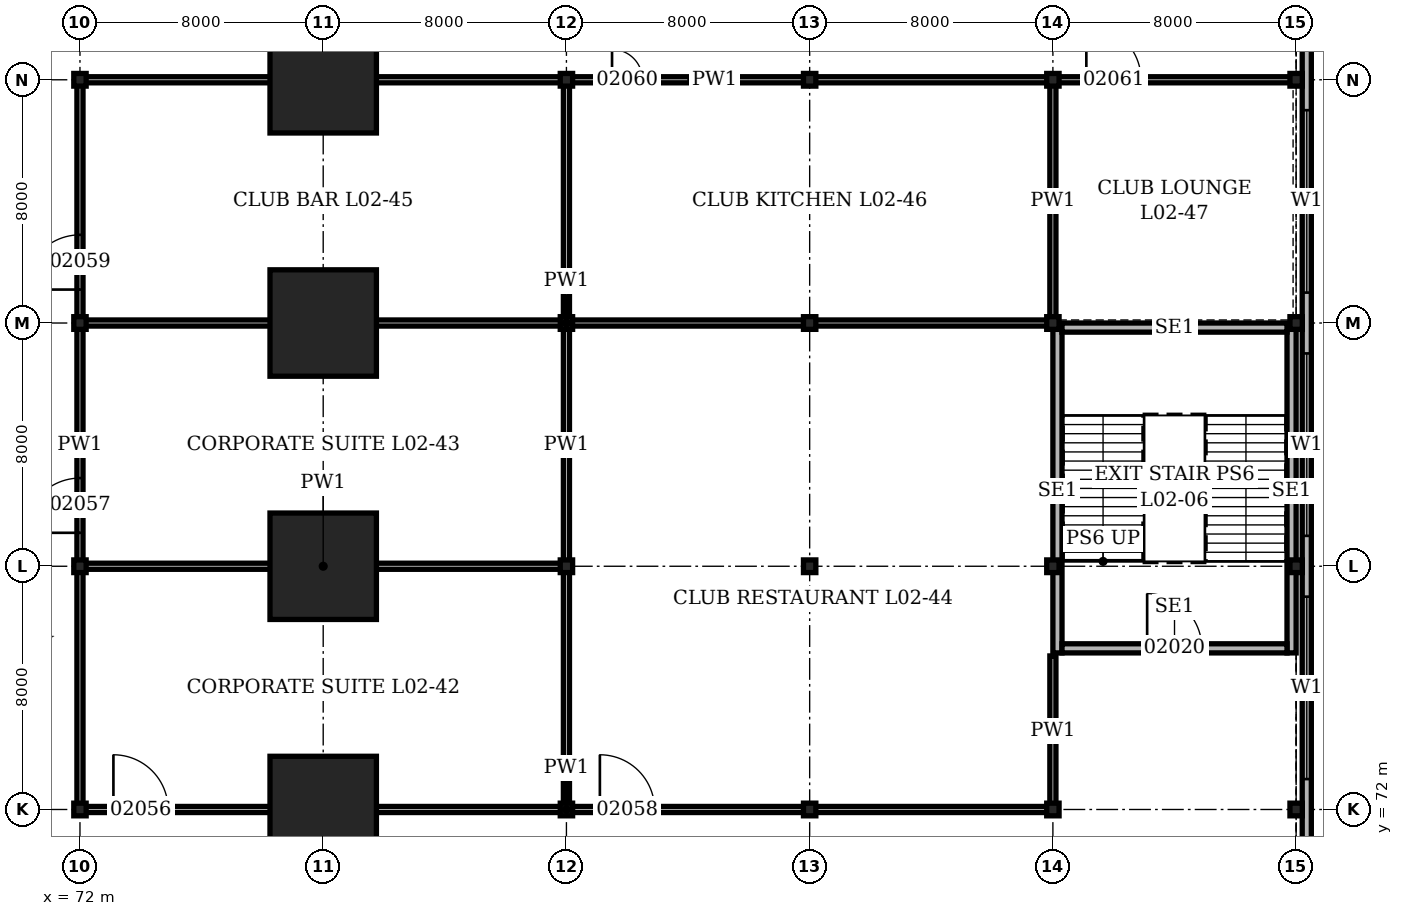
"""IFC4 building model, lengths in metres.
Left out: names, types, materials, properties, quantities, classifications, styles, units other than length and angle.
Written with IfcOpenShell. Run it as: python <this file> out.ifc"""

import sys

from ifc_helpers import new_model, si_unit, direction, frame, frame_2d, origin, origin_2d, place, context, subcontext, project, spatial, rectangle, hollow_rectangle, i_section, extrude, element, fill, save


model = new_model("IFC4")
c1 = context("Model", 3, precision=1e-05, world=origin(), true_north=direction((0.0, 1.0)))
c2 = subcontext(c1, "Body", "Model", "MODEL_VIEW")
j1 = project(units=[si_unit("LENGTHUNIT", "METRE"), si_unit("PLANEANGLEUNIT", "RADIAN")], contexts=[c1])
p1 = place(None, origin())
s1 = spatial("IfcSite", under=j1, at=p1, CompositionType="ELEMENT")
p2 = place(p1, origin())
s2 = spatial("IfcBuilding", under=s1, at=p2, CompositionType="ELEMENT")
p3 = place(p2, frame((0.0, 0.0, 9.9)))
s3 = spatial("IfcBuildingStorey", under=s2, at=p3, CompositionType="ELEMENT", Elevation=9.9)
for number, where, z_axis, x_axis in (
    (1, (72.0, 72.0, 0.0), (0.0, 0.0, 1.0), (1.0, 0.0, 0.0)),
    (2, (72.0, 80.0, 0.0), (0.0, 0.0, 1.0), (1.0, 0.0, 0.0)),
    (3, (72.0, 88.0, 0.0), (0.0, 0.0, 1.0), (1.0, 0.0, 0.0)),
    (4, (72.0, 96.0, 0.0), (0.0, 0.0, 1.0), (1.0, 0.0, 0.0)),
):
    element("IfcColumn", number, at=place(p3, frame(where, z_axis=z_axis, x_axis=x_axis)), inside=s3, PredefinedType="COLUMN", context=c2, shape_type="SweptSolid", body=[
        extrude(i_section(OverallWidth=0.406, OverallDepth=0.417, WebThickness=0.03, FlangeThickness=0.048, at=origin_2d()), origin(), (0.0, 0.0, 1.0), 5.0),
    ])
for number, where, z_axis, x_axis in (
    (5, (80.0, 72.0, 0.0), (0.0, 0.0, 1.0), (1.0, 0.0, 0.0)),
    (6, (80.0, 80.0, 0.0), (0.0, 0.0, 1.0), (1.0, 0.0, 0.0)),
    (7, (80.0, 88.0, 0.0), (0.0, 0.0, 1.0), (1.0, 0.0, 0.0)),
    (8, (80.0, 96.0, 0.0), (0.0, 0.0, 1.0), (1.0, 0.0, 0.0)),
):
    element("IfcColumn", number, at=place(p3, frame(where, z_axis=z_axis, x_axis=x_axis)), inside=s3, PredefinedType="COLUMN", context=c2, shape_type="SweptSolid", body=[
        extrude(hollow_rectangle(XDim=3.5, YDim=3.5, WallThickness=0.5, at=origin_2d()), origin(), (0.0, 0.0, 1.0), 5.0),
    ])
for number, where, z_axis, x_axis in (
    (9, (88.0, 72.0, 0.0), (0.0, 0.0, 1.0), (1.0, 0.0, 0.0)),
    (10, (88.0, 80.0, 0.0), (0.0, 0.0, 1.0), (1.0, 0.0, 0.0)),
    (11, (88.0, 88.0, 0.0), (0.0, 0.0, 1.0), (1.0, 0.0, 0.0)),
    (12, (88.0, 96.0, 0.0), (0.0, 0.0, 1.0), (1.0, 0.0, 0.0)),
    (13, (96.0, 72.0, 0.0), (0.0, 0.0, 1.0), (1.0, 0.0, 0.0)),
    (14, (96.0, 80.0, 0.0), (0.0, 0.0, 1.0), (1.0, 0.0, 0.0)),
    (15, (96.0, 88.0, 0.0), (0.0, 0.0, 1.0), (1.0, 0.0, 0.0)),
    (16, (96.0, 96.0, 0.0), (0.0, 0.0, 1.0), (1.0, 0.0, 0.0)),
    (17, (104.0, 72.0, 0.0), (0.0, 0.0, 1.0), (1.0, 0.0, 0.0)),
    (18, (104.0, 80.0, 0.0), (0.0, 0.0, 1.0), (1.0, 0.0, 0.0)),
    (19, (104.0, 88.0, 0.0), (0.0, 0.0, 1.0), (1.0, 0.0, 0.0)),
    (20, (104.0, 96.0, 0.0), (0.0, 0.0, 1.0), (1.0, 0.0, 0.0)),
    (21, (112.0, 72.0, 0.0), (0.0, 0.0, 1.0), (1.0, 0.0, 0.0)),
    (22, (112.0, 80.0, 0.0), (0.0, 0.0, 1.0), (1.0, 0.0, 0.0)),
    (23, (112.0, 88.0, 0.0), (0.0, 0.0, 1.0), (1.0, 0.0, 0.0)),
    (24, (112.0, 96.0, 0.0), (0.0, 0.0, 1.0), (1.0, 0.0, 0.0)),
):
    element("IfcColumn", number, at=place(p3, frame(where, z_axis=z_axis, x_axis=x_axis)), inside=s3, PredefinedType="COLUMN", context=c2, shape_type="SweptSolid", body=[
        extrude(i_section(OverallWidth=0.406, OverallDepth=0.417, WebThickness=0.03, FlangeThickness=0.048, at=origin_2d()), origin(), (0.0, 0.0, 1.0), 5.0),
    ])
p4 = place(p3, frame((112.35, -0.35, 0.0), z_axis=(0.0, 0.0, 1.0), x_axis=(0.0, 1.0, 0.0)))
e25 = element("IfcWall", 25, at=p4, inside=s3, PredefinedType="SOLIDWALL", context=c2, shape_type="SweptSolid", body=[
    extrude(rectangle(XDim=112.7, YDim=0.3, at=frame_2d((56.35, 0.0))), origin(), (0.0, 0.0, 1.0), 5.0),
])
p5 = place(p4, frame((1.35, 0.0, 1.0)))
e26 = element("IfcOpeningElement", 26, at=p5, cuts=e25, PredefinedType="OPENING", context=c2, shape_type="SweptSolid", body=[
    extrude(rectangle(XDim=6.0, YDim=1.5, at=frame_2d((3.0, 0.75))), frame((0.0, 0.16, 0.0), z_axis=(0.0, -1.0, 0.0), x_axis=(1.0, 0.0, 0.0)), (0.0, 0.0, 1.0), 0.32),
])
p6 = place(p4, frame((9.35, 0.0, 1.0)))
e27 = element("IfcOpeningElement", 27, at=p6, cuts=e25, PredefinedType="OPENING", context=c2, shape_type="SweptSolid", body=[
    extrude(rectangle(XDim=6.0, YDim=1.5, at=frame_2d((3.0, 0.75))), frame((0.0, 0.16, 0.0), z_axis=(0.0, -1.0, 0.0), x_axis=(1.0, 0.0, 0.0)), (0.0, 0.0, 1.0), 0.32),
])
p7 = place(p4, frame((17.35, 0.0, 1.0)))
e28 = element("IfcOpeningElement", 28, at=p7, cuts=e25, PredefinedType="OPENING", context=c2, shape_type="SweptSolid", body=[
    extrude(rectangle(XDim=6.0, YDim=1.5, at=frame_2d((3.0, 0.75))), frame((0.0, 0.16, 0.0), z_axis=(0.0, -1.0, 0.0), x_axis=(1.0, 0.0, 0.0)), (0.0, 0.0, 1.0), 0.32),
])
p8 = place(p4, frame((25.35, 0.0, 1.0)))
e29 = element("IfcOpeningElement", 29, at=p8, cuts=e25, PredefinedType="OPENING", context=c2, shape_type="SweptSolid", body=[
    extrude(rectangle(XDim=6.0, YDim=1.5, at=frame_2d((3.0, 0.75))), frame((0.0, 0.16, 0.0), z_axis=(0.0, -1.0, 0.0), x_axis=(1.0, 0.0, 0.0)), (0.0, 0.0, 1.0), 0.32),
])
p9 = place(p4, frame((33.35, 0.0, 1.0)))
e30 = element("IfcOpeningElement", 30, at=p9, cuts=e25, PredefinedType="OPENING", context=c2, shape_type="SweptSolid", body=[
    extrude(rectangle(XDim=6.0, YDim=1.5, at=frame_2d((3.0, 0.75))), frame((0.0, 0.16, 0.0), z_axis=(0.0, -1.0, 0.0), x_axis=(1.0, 0.0, 0.0)), (0.0, 0.0, 1.0), 0.32),
])
p10 = place(p4, frame((41.35, 0.0, 1.0)))
e31 = element("IfcOpeningElement", 31, at=p10, cuts=e25, PredefinedType="OPENING", context=c2, shape_type="SweptSolid", body=[
    extrude(rectangle(XDim=6.0, YDim=1.5, at=frame_2d((3.0, 0.75))), frame((0.0, 0.16, 0.0), z_axis=(0.0, -1.0, 0.0), x_axis=(1.0, 0.0, 0.0)), (0.0, 0.0, 1.0), 0.32),
])
p11 = place(p4, frame((49.35, 0.0, 1.0)))
e32 = element("IfcOpeningElement", 32, at=p11, cuts=e25, PredefinedType="OPENING", context=c2, shape_type="SweptSolid", body=[
    extrude(rectangle(XDim=6.0, YDim=1.5, at=frame_2d((3.0, 0.75))), frame((0.0, 0.16, 0.0), z_axis=(0.0, -1.0, 0.0), x_axis=(1.0, 0.0, 0.0)), (0.0, 0.0, 1.0), 0.32),
])
p12 = place(p4, frame((57.35, 0.0, 1.0)))
e33 = element("IfcOpeningElement", 33, at=p12, cuts=e25, PredefinedType="OPENING", context=c2, shape_type="SweptSolid", body=[
    extrude(rectangle(XDim=6.0, YDim=1.5, at=frame_2d((3.0, 0.75))), frame((0.0, 0.16, 0.0), z_axis=(0.0, -1.0, 0.0), x_axis=(1.0, 0.0, 0.0)), (0.0, 0.0, 1.0), 0.32),
])
p13 = place(p4, frame((65.35, 0.0, 1.0)))
e34 = element("IfcOpeningElement", 34, at=p13, cuts=e25, PredefinedType="OPENING", context=c2, shape_type="SweptSolid", body=[
    extrude(rectangle(XDim=6.0, YDim=1.5, at=frame_2d((3.0, 0.75))), frame((0.0, 0.16, 0.0), z_axis=(0.0, -1.0, 0.0), x_axis=(1.0, 0.0, 0.0)), (0.0, 0.0, 1.0), 0.32),
])
p14 = place(p4, frame((73.35, 0.0, 1.0)))
e35 = element("IfcOpeningElement", 35, at=p14, cuts=e25, PredefinedType="OPENING", context=c2, shape_type="SweptSolid", body=[
    extrude(rectangle(XDim=6.0, YDim=1.5, at=frame_2d((3.0, 0.75))), frame((0.0, 0.16, 0.0), z_axis=(0.0, -1.0, 0.0), x_axis=(1.0, 0.0, 0.0)), (0.0, 0.0, 1.0), 0.32),
])
p15 = place(p4, frame((81.35, 0.0, 1.0)))
e36 = element("IfcOpeningElement", 36, at=p15, cuts=e25, PredefinedType="OPENING", context=c2, shape_type="SweptSolid", body=[
    extrude(rectangle(XDim=6.0, YDim=1.5, at=frame_2d((3.0, 0.75))), frame((0.0, 0.16, 0.0), z_axis=(0.0, -1.0, 0.0), x_axis=(1.0, 0.0, 0.0)), (0.0, 0.0, 1.0), 0.32),
])
p16 = place(p4, frame((89.35, 0.0, 1.0)))
e37 = element("IfcOpeningElement", 37, at=p16, cuts=e25, PredefinedType="OPENING", context=c2, shape_type="SweptSolid", body=[
    extrude(rectangle(XDim=6.0, YDim=1.5, at=frame_2d((3.0, 0.75))), frame((0.0, 0.16, 0.0), z_axis=(0.0, -1.0, 0.0), x_axis=(1.0, 0.0, 0.0)), (0.0, 0.0, 1.0), 0.32),
])
p17 = place(p4, frame((97.35, 0.0, 1.0)))
e38 = element("IfcOpeningElement", 38, at=p17, cuts=e25, PredefinedType="OPENING", context=c2, shape_type="SweptSolid", body=[
    extrude(rectangle(XDim=6.0, YDim=1.5, at=frame_2d((3.0, 0.75))), frame((0.0, 0.16, 0.0), z_axis=(0.0, -1.0, 0.0), x_axis=(1.0, 0.0, 0.0)), (0.0, 0.0, 1.0), 0.32),
])
p18 = place(p4, frame((105.35, 0.0, 1.0)))
e39 = element("IfcOpeningElement", 39, at=p18, cuts=e25, PredefinedType="OPENING", context=c2, shape_type="SweptSolid", body=[
    extrude(rectangle(XDim=6.0, YDim=1.5, at=frame_2d((3.0, 0.75))), frame((0.0, 0.16, 0.0), z_axis=(0.0, -1.0, 0.0), x_axis=(1.0, 0.0, 0.0)), (0.0, 0.0, 1.0), 0.32),
])
for number, where, z_axis, x_axis in (
    (40, (104.15, 77.15, 0.0), (0.0, 0.0, 1.0), (0.0, 1.0, 0.0)),
    (41, (111.85, 77.15, 0.0), (0.0, 0.0, 1.0), (0.0, 1.0, 0.0)),
):
    element("IfcWall", number, at=place(p3, frame(where, z_axis=z_axis, x_axis=x_axis)), inside=s3, PredefinedType="SOLIDWALL", context=c2, shape_type="SweptSolid", body=[
        extrude(rectangle(XDim=10.642, YDim=0.3, at=frame_2d((5.321, 0.0))), origin(), (0.0, 0.0, 1.0), 4.8),
    ])
p19 = place(p3, frame((104.3, 77.3, 0.0), z_axis=(0.0, 0.0, 1.0), x_axis=(1.0, 0.0, 0.0)))
e42 = element("IfcWall", 42, at=p19, inside=s3, PredefinedType="SOLIDWALL", context=c2, shape_type="SweptSolid", body=[
    extrude(rectangle(XDim=7.4, YDim=0.3, at=frame_2d((3.7, 0.0))), origin(), (0.0, 0.0, 1.0), 4.8),
])
p20 = place(p19, frame((2.8, 0.0, 0.0)))
e43 = element("IfcOpeningElement", 43, at=p20, cuts=e42, PredefinedType="OPENING", context=c2, shape_type="SweptSolid", body=[
    extrude(rectangle(XDim=1.8, YDim=2.1, at=frame_2d((0.9, 1.05))), frame((0.0, 0.16, 0.0), z_axis=(0.0, -1.0, 0.0), x_axis=(1.0, 0.0, 0.0)), (0.0, 0.0, 1.0), 0.32),
])
p21 = place(p3, frame((104.3, 87.85, 0.0), z_axis=(0.0, 0.0, 1.0), x_axis=(1.0, 0.0, 0.0)))
e44 = element("IfcWall", 44, at=p21, inside=s3, PredefinedType="SOLIDWALL", context=c2, shape_type="SweptSolid", body=[
    extrude(rectangle(XDim=7.4, YDim=0.3, at=frame_2d((3.7, 0.0))), origin(), (0.0, 0.0, 1.0), 4.8),
])
p22 = place(p3, frame((72.1, 72.0, 0.0), z_axis=(0.0, 0.0, 1.0), x_axis=(1.0, 0.0, 0.0)))
e45 = element("IfcWall", 45, at=p22, inside=s3, PredefinedType="PARTITIONING", context=c2, shape_type="SweptSolid", body=[
    extrude(rectangle(XDim=31.8, YDim=0.2, at=frame_2d((15.9, 0.0))), origin(), (0.0, 0.0, 1.0), 4.028),
])
p23 = place(p22, frame((1.0, 0.0, 0.0)))
e46 = element("IfcOpeningElement", 46, at=p23, cuts=e45, PredefinedType="OPENING", context=c2, shape_type="SweptSolid", body=[
    extrude(rectangle(XDim=1.8, YDim=2.4, at=frame_2d((0.9, 1.2))), frame((0.0, 0.11, 0.0), z_axis=(0.0, -1.0, 0.0), x_axis=(1.0, 0.0, 0.0)), (0.0, 0.0, 1.0), 0.22),
])
p24 = place(p22, frame((17.0, 0.0, 0.0)))
e47 = element("IfcOpeningElement", 47, at=p24, cuts=e45, PredefinedType="OPENING", context=c2, shape_type="SweptSolid", body=[
    extrude(rectangle(XDim=1.8, YDim=2.4, at=frame_2d((0.9, 1.2))), frame((0.0, 0.11, 0.0), z_axis=(0.0, -1.0, 0.0), x_axis=(1.0, 0.0, 0.0)), (0.0, 0.0, 1.0), 0.22),
])
p25 = place(p3, frame((72.1, 80.0, 0.0), z_axis=(0.0, 0.0, 1.0), x_axis=(1.0, 0.0, 0.0)))
e48 = element("IfcWall", 48, at=p25, inside=s3, PredefinedType="PARTITIONING", context=c2, shape_type="SweptSolid", body=[
    extrude(rectangle(XDim=15.8, YDim=0.2, at=frame_2d((7.9, 0.0))), origin(), (0.0, 0.0, 1.0), 4.028),
])
p26 = place(p3, frame((72.1, 88.0, 0.0), z_axis=(0.0, 0.0, 1.0), x_axis=(1.0, 0.0, 0.0)))
e49 = element("IfcWall", 49, at=p26, inside=s3, PredefinedType="PARTITIONING", context=c2, shape_type="SweptSolid", body=[
    extrude(rectangle(XDim=31.8, YDim=0.2, at=frame_2d((15.9, 0.0))), origin(), (0.0, 0.0, 1.0), 4.028),
])
p27 = place(p3, frame((72.1, 96.0, 0.0), z_axis=(0.0, 0.0, 1.0), x_axis=(1.0, 0.0, 0.0)))
e50 = element("IfcWall", 50, at=p27, inside=s3, PredefinedType="PARTITIONING", context=c2, shape_type="SweptSolid", body=[
    extrude(rectangle(XDim=40.05, YDim=0.2, at=frame_2d((20.025, 0.0))), origin(), (0.0, 0.0, 1.0), 4.028),
])
p28 = place(p27, frame((17.4, 0.0, 0.0)))
e51 = element("IfcOpeningElement", 51, at=p28, cuts=e50, PredefinedType="OPENING", context=c2, shape_type="SweptSolid", body=[
    extrude(rectangle(XDim=1.0, YDim=2.1, at=frame_2d((0.5, 1.05))), frame((0.0, 0.11, 0.0), z_axis=(0.0, -1.0, 0.0), x_axis=(1.0, 0.0, 0.0)), (0.0, 0.0, 1.0), 0.22),
])
p29 = place(p27, frame((33.0, 0.0, 0.0)))
e52 = element("IfcOpeningElement", 52, at=p29, cuts=e50, PredefinedType="OPENING", context=c2, shape_type="SweptSolid", body=[
    extrude(rectangle(XDim=1.8, YDim=2.4, at=frame_2d((0.9, 1.2))), frame((0.0, 0.11, 0.0), z_axis=(0.0, -1.0, 0.0), x_axis=(1.0, 0.0, 0.0)), (0.0, 0.0, 1.0), 0.22),
])
p30 = place(p3, frame((72.0, 72.1, 0.0), z_axis=(0.0, 0.0, 1.0), x_axis=(0.0, 1.0, 0.0)))
e53 = element("IfcWall", 53, at=p30, inside=s3, PredefinedType="PARTITIONING", context=c2, shape_type="SweptSolid", body=[
    extrude(rectangle(XDim=23.8, YDim=0.2, at=frame_2d((11.9, 0.0))), origin(), (0.0, 0.0, 1.0), 4.028),
])
p31 = place(p30, frame((9.0, 0.0, 0.0)))
e54 = element("IfcOpeningElement", 54, at=p31, cuts=e53, PredefinedType="OPENING", context=c2, shape_type="SweptSolid", body=[
    extrude(rectangle(XDim=1.8, YDim=2.4, at=frame_2d((0.9, 1.2))), frame((0.0, 0.11, 0.0), z_axis=(0.0, -1.0, 0.0), x_axis=(1.0, 0.0, 0.0)), (0.0, 0.0, 1.0), 0.22),
])
p32 = place(p30, frame((17.0, 0.0, 0.0)))
e55 = element("IfcOpeningElement", 55, at=p32, cuts=e53, PredefinedType="OPENING", context=c2, shape_type="SweptSolid", body=[
    extrude(rectangle(XDim=1.8, YDim=2.4, at=frame_2d((0.9, 1.2))), frame((0.0, 0.11, 0.0), z_axis=(0.0, -1.0, 0.0), x_axis=(1.0, 0.0, 0.0)), (0.0, 0.0, 1.0), 0.22),
])
p33 = place(p3, frame((88.0, 72.1, 0.0), z_axis=(0.0, 0.0, 1.0), x_axis=(0.0, 1.0, 0.0)))
e56 = element("IfcWall", 56, at=p33, inside=s3, PredefinedType="PARTITIONING", context=c2, shape_type="SweptSolid", body=[
    extrude(rectangle(XDim=23.8, YDim=0.2, at=frame_2d((11.9, 0.0))), origin(), (0.0, 0.0, 1.0), 4.028),
])
p34 = place(p3, frame((104.0, 72.1, 0.0), z_axis=(0.0, 0.0, 1.0), x_axis=(0.0, 1.0, 0.0)))
e57 = element("IfcWall", 57, at=p34, inside=s3, PredefinedType="PARTITIONING", context=c2, shape_type="SweptSolid", body=[
    extrude(rectangle(XDim=4.95, YDim=0.2, at=frame_2d((2.475, 0.0))), origin(), (0.0, 0.0, 1.0), 4.028),
])
p35 = place(p3, frame((104.0, 88.1, 0.0), z_axis=(0.0, 0.0, 1.0), x_axis=(0.0, 1.0, 0.0)))
e58 = element("IfcWall", 58, at=p35, inside=s3, PredefinedType="PARTITIONING", context=c2, shape_type="SweptSolid", body=[
    extrude(rectangle(XDim=7.8, YDim=0.2, at=frame_2d((3.9, 0.0))), origin(), (0.0, 0.0, 1.0), 4.028),
])
p36 = place(p14, origin())
e59 = element("IfcWindow", 59, at=p36, inside=s3, PartitioningType="SINGLE_PANEL", PredefinedType="WINDOW", context=c2, shape_type="SweptSolid", body=[
    extrude(rectangle(XDim=6.0, YDim=1.5, at=frame_2d((3.0, 0.75))), frame((0.0, 0.03, 0.0), z_axis=(0.0, -1.0, 0.0), x_axis=(1.0, 0.0, 0.0)), (0.0, 0.0, 1.0), 0.06),
])
fill(e35, e59)
p37 = place(p15, origin())
e60 = element("IfcWindow", 60, at=p37, inside=s3, PartitioningType="SINGLE_PANEL", PredefinedType="WINDOW", context=c2, shape_type="SweptSolid", body=[
    extrude(rectangle(XDim=6.0, YDim=1.5, at=frame_2d((3.0, 0.75))), frame((0.0, 0.03, 0.0), z_axis=(0.0, -1.0, 0.0), x_axis=(1.0, 0.0, 0.0)), (0.0, 0.0, 1.0), 0.06),
])
fill(e36, e60)
p38 = place(p16, origin())
e61 = element("IfcWindow", 61, at=p38, inside=s3, PartitioningType="SINGLE_PANEL", PredefinedType="WINDOW", context=c2, shape_type="SweptSolid", body=[
    extrude(rectangle(XDim=6.0, YDim=1.5, at=frame_2d((3.0, 0.75))), frame((0.0, 0.03, 0.0), z_axis=(0.0, -1.0, 0.0), x_axis=(1.0, 0.0, 0.0)), (0.0, 0.0, 1.0), 0.06),
])
fill(e37, e61)
p39 = place(p20, origin())
e62 = element("IfcDoor", 62, at=p39, inside=s3, OperationType="DOUBLE_DOOR_SINGLE_SWING", PredefinedType="DOOR", context=c2, shape_type="SweptSolid", body=[
    extrude(rectangle(XDim=1.8, YDim=2.1, at=frame_2d((0.9, 1.05))), frame((0.0, 0.15, 0.0), z_axis=(0.0, -1.0, 0.0), x_axis=(1.0, 0.0, 0.0)), (0.0, 0.0, 1.0), 0.3),
])
fill(e43, e62)
p40 = place(p23, origin())
e63 = element("IfcDoor", 63, at=p40, inside=s3, OperationType="DOUBLE_DOOR_DOUBLE_SWING", PredefinedType="DOOR", context=c2, shape_type="SweptSolid", body=[
    extrude(rectangle(XDim=1.8, YDim=2.4, at=frame_2d((0.9, 1.2))), frame((0.0, 0.1, 0.0), z_axis=(0.0, -1.0, 0.0), x_axis=(1.0, 0.0, 0.0)), (0.0, 0.0, 1.0), 0.199),
])
fill(e46, e63)
p41 = place(p31, origin())
e64 = element("IfcDoor", 64, at=p41, inside=s3, OperationType="DOUBLE_DOOR_DOUBLE_SWING", PredefinedType="DOOR", context=c2, shape_type="SweptSolid", body=[
    extrude(rectangle(XDim=1.8, YDim=2.4, at=frame_2d((0.9, 1.2))), frame((0.0, 0.1, 0.0), z_axis=(0.0, -1.0, 0.0), x_axis=(1.0, 0.0, 0.0)), (0.0, 0.0, 1.0), 0.199),
])
fill(e54, e64)
p42 = place(p24, origin())
e65 = element("IfcDoor", 65, at=p42, inside=s3, OperationType="DOUBLE_DOOR_DOUBLE_SWING", PredefinedType="DOOR", context=c2, shape_type="SweptSolid", body=[
    extrude(rectangle(XDim=1.8, YDim=2.4, at=frame_2d((0.9, 1.2))), frame((0.0, 0.1, 0.0), z_axis=(0.0, -1.0, 0.0), x_axis=(1.0, 0.0, 0.0)), (0.0, 0.0, 1.0), 0.199),
])
fill(e47, e65)
p43 = place(p32, origin())
e66 = element("IfcDoor", 66, at=p43, inside=s3, OperationType="DOUBLE_DOOR_DOUBLE_SWING", PredefinedType="DOOR", context=c2, shape_type="SweptSolid", body=[
    extrude(rectangle(XDim=1.8, YDim=2.4, at=frame_2d((0.9, 1.2))), frame((0.0, 0.1, 0.0), z_axis=(0.0, -1.0, 0.0), x_axis=(1.0, 0.0, 0.0)), (0.0, 0.0, 1.0), 0.199),
])
fill(e55, e66)
p44 = place(p28, origin())
e67 = element("IfcDoor", 67, at=p44, inside=s3, OperationType="SINGLE_SWING_LEFT", PredefinedType="DOOR", context=c2, shape_type="SweptSolid", body=[
    extrude(rectangle(XDim=1.0, YDim=2.1, at=frame_2d((0.5, 1.05))), frame((0.0, 0.1, 0.0), z_axis=(0.0, -1.0, 0.0), x_axis=(1.0, 0.0, 0.0)), (0.0, 0.0, 1.0), 0.199),
])
fill(e51, e67)
p45 = place(p29, origin())
e68 = element("IfcDoor", 68, at=p45, inside=s3, OperationType="DOUBLE_DOOR_DOUBLE_SWING", PredefinedType="DOOR", context=c2, shape_type="SweptSolid", body=[
    extrude(rectangle(XDim=1.8, YDim=2.4, at=frame_2d((0.9, 1.2))), frame((0.0, 0.1, 0.0), z_axis=(0.0, -1.0, 0.0), x_axis=(1.0, 0.0, 0.0)), (0.0, 0.0, 1.0), 0.199),
])
fill(e52, e68)
save(model, sys.argv[1])
